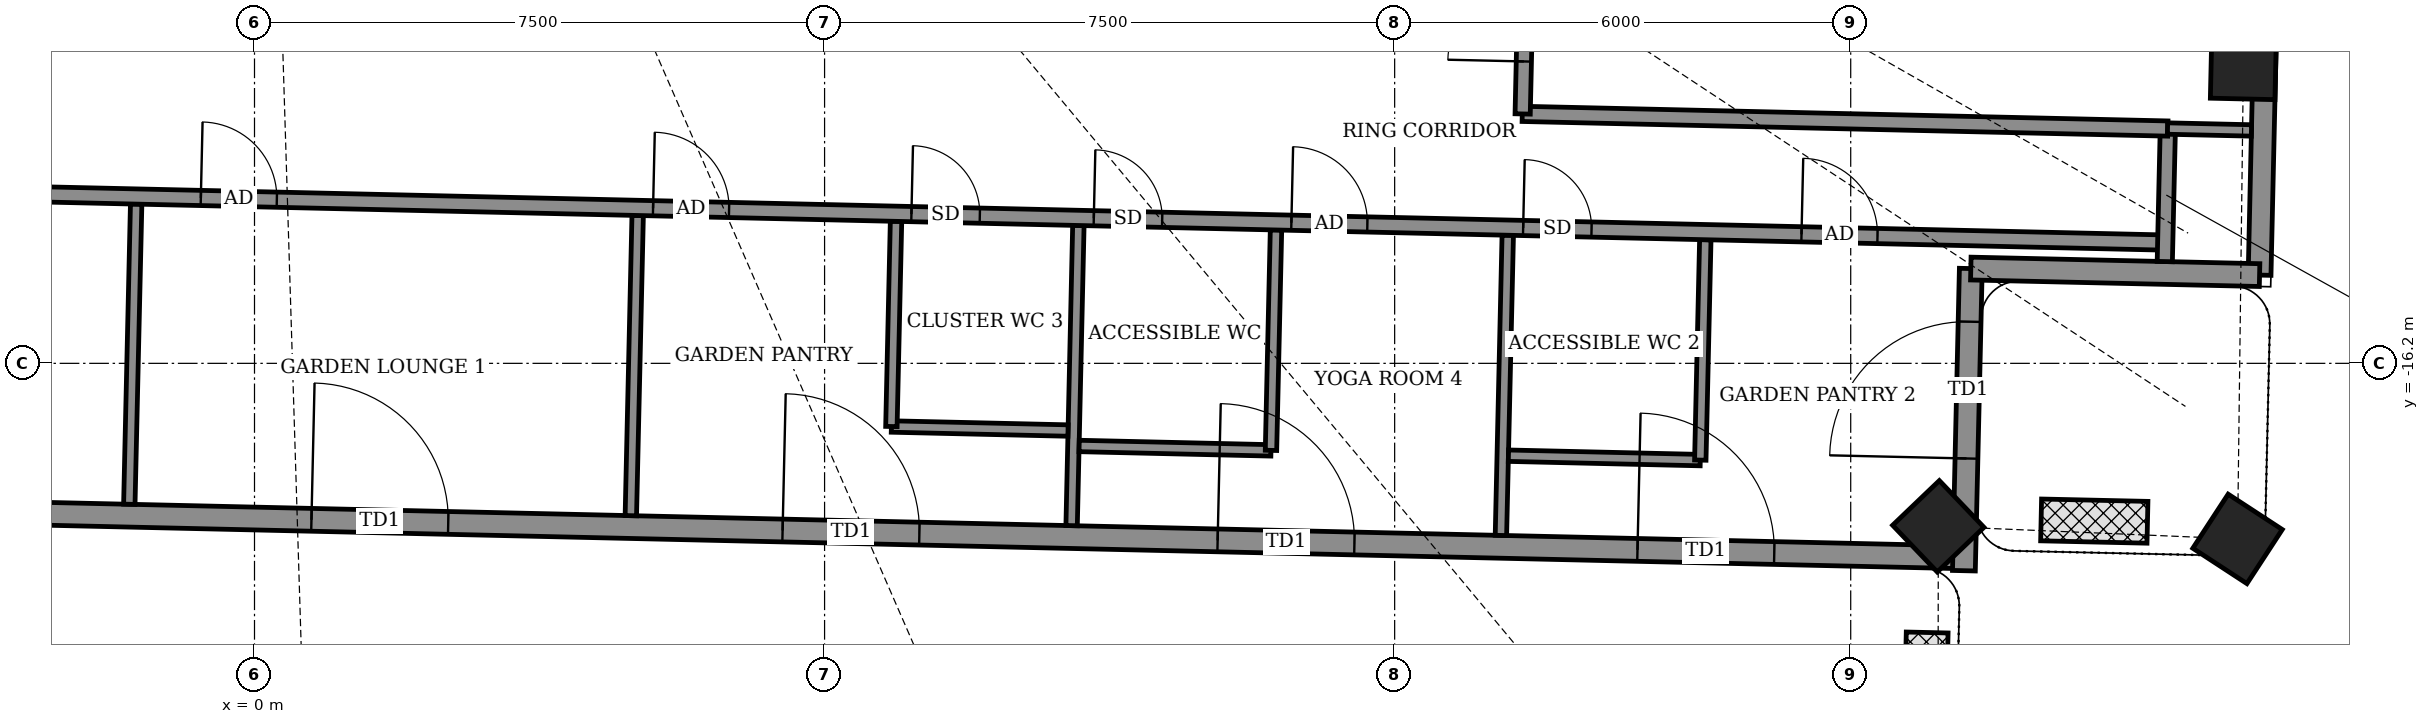
"""IFC4 building model, lengths in metres.
Left out: names, types, materials, properties, quantities, classifications, styles, units other than length and angle.
Written with IfcOpenShell. Run it as: python <this file> out.ifc"""

import sys

from ifc_helpers import new_model, si_unit, direction, frame, frame_2d, origin, origin_2d, place, context, subcontext, project, spatial, rectangle, extrude, element, fill, save


model = new_model("IFC4")
c1 = context("Model", 3, precision=1e-05, world=origin(), true_north=direction((0.0, 1.0)))
c2 = subcontext(c1, "Body", "Model", "MODEL_VIEW")
j1 = project(units=[si_unit("LENGTHUNIT", "METRE"), si_unit("PLANEANGLEUNIT", "RADIAN")], contexts=[c1])
p1 = place(None, origin())
s1 = spatial("IfcSite", under=j1, at=p1, CompositionType="ELEMENT")
p2 = place(p1, origin())
s2 = spatial("IfcBuilding", under=s1, at=p2, CompositionType="ELEMENT")
p3 = place(p2, frame((0.0, 0.0, 337.9)))
s3 = spatial("IfcBuildingStorey", under=s2, at=p3, CompositionType="ELEMENT", Elevation=337.9)
for number, where, z_axis, x_axis in (
    (1, (22.152, -18.344, -0.55), (0.0, 0.0, 1.0), (0.723, 0.691, 0.0)),
    (2, (26.089, -18.51, -0.55), (0.0, 0.0, 1.0), (0.547, 0.837, 0.0)),
    (3, (26.166, -12.296, -0.55), (0.0, 0.0, 1.0), (0.023, 1.0, 0.0)),
):
    element("IfcColumn", number, at=place(p3, frame(where, z_axis=z_axis, x_axis=x_axis)), inside=s3, PredefinedType="COLUMN", context=c2, shape_type="SweptSolid", body=[
        extrude(rectangle(XDim=0.85, YDim=0.85, at=origin_2d()), origin(), (0.0, 0.0, 1.0), 4.6),
    ])
p4 = place(p3, frame((26.379, -15.039, 0.0), z_axis=(0.0, 0.0, 1.0), x_axis=(0.022668695782, 0.9997430321, 0.0)))
e4 = element("IfcWall", 4, at=p4, inside=s3, PredefinedType="SOLIDWALL", context=c2, shape_type="SweptSolid", body=[
    extrude(rectangle(XDim=9.574, YDim=0.3, at=frame_2d((4.787, 0.0))), origin(), (0.0, 0.0, 1.0), 2.75),
])
p5 = place(p4, frame((3.752, 0.0, 0.9)))
e5 = element("IfcOpeningElement", 5, at=p5, cuts=e4, PredefinedType="OPENING", context=c2, shape_type="SweptSolid", body=[
    extrude(rectangle(XDim=2.4, YDim=1.8, at=frame_2d((1.2, 0.9))), frame((0.0, 0.16, 0.0), z_axis=(0.0, -1.0, 0.0), x_axis=(1.0, 0.0, 0.0)), (0.0, 0.0, 1.0), 0.32),
])
p6 = place(p3, frame((-21.395, -17.756, 0.0), z_axis=(0.0, 0.0, 1.0), x_axis=(0.999742664636, -0.022684895998, 0.0)))
e6 = element("IfcWall", 6, at=p6, inside=s3, PredefinedType="SOLIDWALL", context=c2, shape_type="SweptSolid", body=[
    extrude(rectangle(XDim=43.899, YDim=0.3, at=frame_2d((21.95, 0.0))), origin(), (0.0, 0.0, 1.0), 2.65),
])
p7 = place(p6, frame((2.625, 0.0, 0.0)))
e7 = element("IfcOpeningElement", 7, at=p7, cuts=e6, PredefinedType="OPENING", context=c2, shape_type="SweptSolid", body=[
    extrude(rectangle(XDim=1.8, YDim=2.4, at=frame_2d((0.9, 1.2))), frame((0.0, 0.16, 0.0), z_axis=(0.0, -1.0, 0.0), x_axis=(1.0, 0.0, 0.0)), (0.0, 0.0, 1.0), 0.32),
])
p8 = place(p6, frame((10.05, 0.0, 0.0)))
e8 = element("IfcOpeningElement", 8, at=p8, cuts=e6, PredefinedType="OPENING", context=c2, shape_type="SweptSolid", body=[
    extrude(rectangle(XDim=1.8, YDim=2.4, at=frame_2d((0.9, 1.2))), frame((0.0, 0.16, 0.0), z_axis=(0.0, -1.0, 0.0), x_axis=(1.0, 0.0, 0.0)), (0.0, 0.0, 1.0), 0.32),
])
p9 = place(p6, frame((16.325, 0.0, 0.0)))
e9 = element("IfcOpeningElement", 9, at=p9, cuts=e6, PredefinedType="OPENING", context=c2, shape_type="SweptSolid", body=[
    extrude(rectangle(XDim=1.8, YDim=2.4, at=frame_2d((0.9, 1.2))), frame((0.0, 0.16, 0.0), z_axis=(0.0, -1.0, 0.0), x_axis=(1.0, 0.0, 0.0)), (0.0, 0.0, 1.0), 0.32),
])
p10 = place(p6, frame((22.15, 0.0, 0.0)))
e10 = element("IfcOpeningElement", 10, at=p10, cuts=e6, PredefinedType="OPENING", context=c2, shape_type="SweptSolid", body=[
    extrude(rectangle(XDim=1.8, YDim=2.4, at=frame_2d((0.9, 1.2))), frame((0.0, 0.16, 0.0), z_axis=(0.0, -1.0, 0.0), x_axis=(1.0, 0.0, 0.0)), (0.0, 0.0, 1.0), 0.32),
])
p11 = place(p6, frame((28.35, 0.0, 0.0)))
e11 = element("IfcOpeningElement", 11, at=p11, cuts=e6, PredefinedType="OPENING", context=c2, shape_type="SweptSolid", body=[
    extrude(rectangle(XDim=1.8, YDim=2.4, at=frame_2d((0.9, 1.2))), frame((0.0, 0.16, 0.0), z_axis=(0.0, -1.0, 0.0), x_axis=(1.0, 0.0, 0.0)), (0.0, 0.0, 1.0), 0.32),
])
p12 = place(p6, frame((34.075, 0.0, 0.0)))
e12 = element("IfcOpeningElement", 12, at=p12, cuts=e6, PredefinedType="OPENING", context=c2, shape_type="SweptSolid", body=[
    extrude(rectangle(XDim=1.8, YDim=2.4, at=frame_2d((0.9, 1.2))), frame((0.0, 0.16, 0.0), z_axis=(0.0, -1.0, 0.0), x_axis=(1.0, 0.0, 0.0)), (0.0, 0.0, 1.0), 0.32),
])
p13 = place(p6, frame((39.6, 0.0, 0.0)))
e13 = element("IfcOpeningElement", 13, at=p13, cuts=e6, PredefinedType="OPENING", context=c2, shape_type="SweptSolid", body=[
    extrude(rectangle(XDim=1.8, YDim=2.4, at=frame_2d((0.9, 1.2))), frame((0.0, 0.16, 0.0), z_axis=(0.0, -1.0, 0.0), x_axis=(1.0, 0.0, 0.0)), (0.0, 0.0, 1.0), 0.32),
])
p14 = place(p3, frame((22.489, -18.928, 0.0), z_axis=(0.0, 0.0, 1.0), x_axis=(0.022902724569, 0.999737698203, 0.0)))
e14 = element("IfcWall", 14, at=p14, inside=s3, PredefinedType="SOLIDWALL", context=c2, shape_type="SweptSolid", body=[
    extrude(rectangle(XDim=3.976, YDim=0.3, at=frame_2d((1.988, 0.0))), origin(), (0.0, 0.0, 1.0), 2.65),
])
p15 = place(p14, frame((1.477, 0.0, 0.0)))
e15 = element("IfcOpeningElement", 15, at=p15, cuts=e14, PredefinedType="OPENING", context=c2, shape_type="SweptSolid", body=[
    extrude(rectangle(XDim=1.8, YDim=2.4, at=frame_2d((0.9, 1.2))), frame((0.0, 0.16, 0.0), z_axis=(0.0, -1.0, 0.0), x_axis=(1.0, 0.0, 0.0)), (0.0, 0.0, 1.0), 0.32),
])
p16 = place(p3, frame((22.58, -14.953, 0.0), z_axis=(0.0, 0.0, 1.0), x_axis=(0.999742763477, -0.022680539557, 0.0)))
e16 = element("IfcWall", 16, at=p16, inside=s3, PredefinedType="SOLIDWALL", context=c2, shape_type="SweptSolid", body=[
    extrude(rectangle(XDim=3.8, YDim=0.3, at=frame_2d((1.9, 0.0))), origin(), (0.0, 0.0, 1.0), 2.65),
])
p17 = place(p3, frame((24.904, -18.291, 0.0), z_axis=(0.0, 0.0, 1.0), x_axis=(-0.999754553574, 0.022154742332, 0.0)))
e17 = element("IfcWall", 17, at=p17, inside=s3, PredefinedType="USERDEFINED", context=c2, shape_type="SweptSolid", body=[
    extrude(rectangle(XDim=1.399, YDim=0.55, at=frame_2d((0.7, 0.0))), origin(), (0.0, 0.0, 1.0), 0.8),
])
p18 = place(p3, frame((22.006, -19.741, 0.0), z_axis=(0.0, 0.0, 1.0), x_axis=(-0.022836240226, -0.999739219063, 0.0)))
e18 = element("IfcWall", 18, at=p18, inside=s3, PredefinedType="USERDEFINED", context=c2, shape_type="SweptSolid", body=[
    extrude(rectangle(XDim=1.4, YDim=0.55, at=frame_2d((0.7, 0.0))), origin(), (0.0, 0.0, 1.0), 0.8),
])
p19 = place(p3, frame((-1.647, -18.054, 0.0), z_axis=(0.0, 0.0, 1.0), x_axis=(0.022807049009, 0.999739885428, 0.0)))
e19 = element("IfcWall", 19, at=p19, inside=s3, PredefinedType="PARTITIONING", context=c2, shape_type="SweptSolid", body=[
    extrude(rectangle(XDim=3.95, YDim=0.15, at=frame_2d((1.975, 0.0))), origin(), (0.0, 0.0, 1.0), 4.05),
])
p20 = place(p3, frame((4.951, -18.204, 0.0), z_axis=(0.0, 0.0, 1.0), x_axis=(0.022805639811, 0.999739917575, 0.0)))
e20 = element("IfcWall", 20, at=p20, inside=s3, PredefinedType="PARTITIONING", context=c2, shape_type="SweptSolid", body=[
    extrude(rectangle(XDim=3.95, YDim=0.15, at=frame_2d((1.975, 0.0))), origin(), (0.0, 0.0, 1.0), 4.05),
])
p21 = place(p3, frame((10.75, -18.335, 0.0), z_axis=(0.0, 0.0, 1.0), x_axis=(0.022559944643, 0.999745492062, 0.0)))
e21 = element("IfcWall", 21, at=p21, inside=s3, PredefinedType="PARTITIONING", context=c2, shape_type="SweptSolid", body=[
    extrude(rectangle(XDim=3.95, YDim=0.15, at=frame_2d((1.975, 0.0))), origin(), (0.0, 0.0, 1.0), 4.05),
])
p22 = place(p3, frame((16.398, -18.464, 0.0), z_axis=(0.0, 0.0, 1.0), x_axis=(0.022805639811, 0.999739917575, 0.0)))
e22 = element("IfcWall", 22, at=p22, inside=s3, PredefinedType="PARTITIONING", context=c2, shape_type="SweptSolid", body=[
    extrude(rectangle(XDim=3.95, YDim=0.15, at=frame_2d((1.975, 0.0))), origin(), (0.0, 0.0, 1.0), 4.05),
])
p23 = place(p3, frame((10.849, -17.287, 0.0), z_axis=(0.0, 0.0, 1.0), x_axis=(0.999737322729, -0.022919108675, 0.0)))
e23 = element("IfcWall", 23, at=p23, inside=s3, PredefinedType="PARTITIONING", context=c2, shape_type="SweptSolid", body=[
    extrude(rectangle(XDim=2.525, YDim=0.15, at=frame_2d((1.262, 0.0))), origin(), (0.0, 0.0, 1.0), 4.05),
])
p24 = place(p3, frame((13.373, -17.345, 0.0), z_axis=(0.0, 0.0, 1.0), x_axis=(0.022725229174, 0.999741748633, 0.0)))
e24 = element("IfcWall", 24, at=p24, inside=s3, PredefinedType="PARTITIONING", context=c2, shape_type="SweptSolid", body=[
    extrude(rectangle(XDim=2.901, YDim=0.15, at=frame_2d((1.45, 0.0))), origin(), (0.0, 0.0, 1.0), 2.65),
])
p25 = place(p3, frame((16.497, -17.415, 0.0), z_axis=(0.0, 0.0, 1.0), x_axis=(0.999737322729, -0.022919108675, 0.0)))
e25 = element("IfcWall", 25, at=p25, inside=s3, PredefinedType="PARTITIONING", context=c2, shape_type="SweptSolid", body=[
    extrude(rectangle(XDim=2.525, YDim=0.15, at=frame_2d((1.262, 0.0))), origin(), (0.0, 0.0, 1.0), 4.05),
])
p26 = place(p3, frame((19.021, -17.473, 0.0), z_axis=(0.0, 0.0, 1.0), x_axis=(0.022732880677, 0.999741574676, 0.0)))
e26 = element("IfcWall", 26, at=p26, inside=s3, PredefinedType="PARTITIONING", context=c2, shape_type="SweptSolid", body=[
    extrude(rectangle(XDim=2.9, YDim=0.15, at=frame_2d((1.45, 0.0))), origin(), (0.0, 0.0, 1.0), 4.05),
])
p27 = place(p3, frame((8.379, -17.031, 0.0), z_axis=(0.0, 0.0, 1.0), x_axis=(0.999740260747, -0.02279059109, 0.0)))
e27 = element("IfcWall", 27, at=p27, inside=s3, PredefinedType="PARTITIONING", context=c2, shape_type="SweptSolid", body=[
    extrude(rectangle(XDim=2.324, YDim=0.15, at=frame_2d((1.162, 0.0))), origin(), (0.0, 0.0, 1.0), 4.05),
])
p28 = place(p3, frame((8.379, -17.031, 0.0), z_axis=(0.0, 0.0, 1.0), x_axis=(0.02260842146, 0.999744396973, 0.0)))
e28 = element("IfcWall", 28, at=p28, inside=s3, PredefinedType="PARTITIONING", context=c2, shape_type="SweptSolid", body=[
    extrude(rectangle(XDim=2.7, YDim=0.15, at=frame_2d((1.35, 0.0))), origin(), (0.0, 0.0, 1.0), 4.05),
])
p29 = place(p3, frame((-23.849, -13.499, 0.0), z_axis=(0.0, 0.0, 1.0), x_axis=(0.999742429398, -0.022695260756, 0.0)))
e29 = element("IfcWall", 29, at=p29, inside=s3, PredefinedType="PARTITIONING", context=c2, shape_type="SweptSolid", body=[
    extrude(rectangle(XDim=49.0, YDim=0.2, at=frame_2d((24.5, 0.0))), origin(), (0.0, 0.0, 1.0), 2.45),
])
p30 = place(p29, frame((7.55, 0.0, 0.0)))
e30 = element("IfcOpeningElement", 30, at=p30, cuts=e29, PredefinedType="OPENING", context=c2, shape_type="SweptSolid", body=[
    extrude(rectangle(XDim=0.9, YDim=2.1, at=frame_2d((0.45, 1.05))), frame((0.0, 0.11, 0.0), z_axis=(0.0, -1.0, 0.0), x_axis=(1.0, 0.0, 0.0)), (0.0, 0.0, 1.0), 0.22),
])
p31 = place(p29, frame((12.794, 0.0, 0.0)))
e31 = element("IfcOpeningElement", 31, at=p31, cuts=e29, PredefinedType="OPENING", context=c2, shape_type="SweptSolid", body=[
    extrude(rectangle(XDim=1.0, YDim=2.1, at=frame_2d((0.5, 1.05))), frame((0.0, 0.11, 0.0), z_axis=(0.0, -1.0, 0.0), x_axis=(1.0, 0.0, 0.0)), (0.0, 0.0, 1.0), 0.22),
])
p32 = place(p29, frame((9.95, 0.0, 0.0)))
e32 = element("IfcOpeningElement", 32, at=p32, cuts=e29, PredefinedType="OPENING", context=c2, shape_type="SweptSolid", body=[
    extrude(rectangle(XDim=0.9, YDim=2.1, at=frame_2d((0.45, 1.05))), frame((0.0, 0.11, 0.0), z_axis=(0.0, -1.0, 0.0), x_axis=(1.0, 0.0, 0.0)), (0.0, 0.0, 1.0), 0.22),
])
p33 = place(p29, frame((17.45, 0.0, 0.0)))
e33 = element("IfcOpeningElement", 33, at=p33, cuts=e29, PredefinedType="OPENING", context=c2, shape_type="SweptSolid", body=[
    extrude(rectangle(XDim=1.0, YDim=2.1, at=frame_2d((0.5, 1.05))), frame((0.0, 0.11, 0.0), z_axis=(0.0, -1.0, 0.0), x_axis=(1.0, 0.0, 0.0)), (0.0, 0.0, 1.0), 0.22),
])
p34 = place(p29, frame((23.149, 0.0, 0.0)))
e34 = element("IfcOpeningElement", 34, at=p34, cuts=e29, PredefinedType="OPENING", context=c2, shape_type="SweptSolid", body=[
    extrude(rectangle(XDim=1.0, YDim=2.1, at=frame_2d((0.5, 1.05))), frame((0.0, 0.11, 0.0), z_axis=(0.0, -1.0, 0.0), x_axis=(1.0, 0.0, 0.0)), (0.0, 0.0, 1.0), 0.22),
])
p35 = place(p29, frame((29.1, 0.0, 0.0)))
e35 = element("IfcOpeningElement", 35, at=p35, cuts=e29, PredefinedType="OPENING", context=c2, shape_type="SweptSolid", body=[
    extrude(rectangle(XDim=1.0, YDim=2.1, at=frame_2d((0.5, 1.05))), frame((0.0, 0.11, 0.0), z_axis=(0.0, -1.0, 0.0), x_axis=(1.0, 0.0, 0.0)), (0.0, 0.0, 1.0), 0.22),
])
p36 = place(p29, frame((32.5, 0.0, 0.0)))
e36 = element("IfcOpeningElement", 36, at=p36, cuts=e29, PredefinedType="OPENING", context=c2, shape_type="SweptSolid", body=[
    extrude(rectangle(XDim=0.9, YDim=2.1, at=frame_2d((0.45, 1.05))), frame((0.0, 0.11, 0.0), z_axis=(0.0, -1.0, 0.0), x_axis=(1.0, 0.0, 0.0)), (0.0, 0.0, 1.0), 0.22),
])
p37 = place(p29, frame((37.5, 0.0, 0.0)))
e37 = element("IfcOpeningElement", 37, at=p37, cuts=e29, PredefinedType="OPENING", context=c2, shape_type="SweptSolid", body=[
    extrude(rectangle(XDim=1.0, YDim=2.1, at=frame_2d((0.5, 1.05))), frame((0.0, 0.11, 0.0), z_axis=(0.0, -1.0, 0.0), x_axis=(1.0, 0.0, 0.0)), (0.0, 0.0, 1.0), 0.22),
])
p38 = place(p29, frame((34.9, 0.0, 0.0)))
e38 = element("IfcOpeningElement", 38, at=p38, cuts=e29, PredefinedType="OPENING", context=c2, shape_type="SweptSolid", body=[
    extrude(rectangle(XDim=0.9, YDim=2.1, at=frame_2d((0.45, 1.05))), frame((0.0, 0.11, 0.0), z_axis=(0.0, -1.0, 0.0), x_axis=(1.0, 0.0, 0.0)), (0.0, 0.0, 1.0), 0.22),
])
p39 = place(p29, frame((44.213, 0.0, 0.0)))
e39 = element("IfcOpeningElement", 39, at=p39, cuts=e29, PredefinedType="OPENING", context=c2, shape_type="SweptSolid", body=[
    extrude(rectangle(XDim=1.0, YDim=2.1, at=frame_2d((0.5, 1.05))), frame((0.0, 0.11, 0.0), z_axis=(0.0, -1.0, 0.0), x_axis=(1.0, 0.0, 0.0)), (0.0, 0.0, 1.0), 0.22),
])
p40 = place(p29, frame((40.55, 0.0, 0.0)))
e40 = element("IfcOpeningElement", 40, at=p40, cuts=e29, PredefinedType="OPENING", context=c2, shape_type="SweptSolid", body=[
    extrude(rectangle(XDim=0.9, YDim=2.1, at=frame_2d((0.45, 1.05))), frame((0.0, 0.11, 0.0), z_axis=(0.0, -1.0, 0.0), x_axis=(1.0, 0.0, 0.0)), (0.0, 0.0, 1.0), 0.22),
])
p41 = place(p3, frame((25.132, -14.861, 0.0), z_axis=(0.0, 0.0, 1.0), x_axis=(0.02287347828, 0.99973836777, 0.0)))
e41 = element("IfcWall", 41, at=p41, inside=s3, PredefinedType="PARTITIONING", context=c2, shape_type="SweptSolid", body=[
    extrude(rectangle(XDim=1.75, YDim=0.2, at=frame_2d((0.875, 0.0))), origin(), (0.0, 0.0, 1.0), 2.75),
])
p42 = place(p3, frame((16.679, -12.918, 0.0), z_axis=(0.0, 0.0, 1.0), x_axis=(0.999741598108, -0.022731850181, 0.0)))
e42 = element("IfcWall", 42, at=p42, inside=s3, PredefinedType="PARTITIONING", context=c2, shape_type="SweptSolid", body=[
    extrude(rectangle(XDim=8.495, YDim=0.2, at=frame_2d((4.248, 0.0))), origin(), (0.0, 0.0, 1.0), 2.65),
])
p43 = place(p3, frame((16.684, -12.919, 0.0), z_axis=(0.0, 0.0, 1.0), x_axis=(0.022667483124, 0.999743059595, 0.0)))
e43 = element("IfcWall", 43, at=p43, inside=s3, PredefinedType="PARTITIONING", context=c2, shape_type="SweptSolid", body=[
    extrude(rectangle(XDim=5.245, YDim=0.2, at=frame_2d((2.623, 0.0))), origin(), (0.0, 0.0, 1.0), 2.65),
])
p44 = place(p43, frame((0.691, 0.0, 0.0)))
e44 = element("IfcOpeningElement", 44, at=p44, cuts=e43, PredefinedType="OPENING", context=c2, shape_type="SweptSolid", body=[
    extrude(rectangle(XDim=1.0, YDim=2.1, at=frame_2d((0.5, 1.05))), frame((0.0, 0.11, 0.0), z_axis=(0.0, -1.0, 0.0), x_axis=(1.0, 0.0, 0.0)), (0.0, 0.0, 1.0), 0.22),
])
p45 = place(p3, frame((25.168, -13.111, 0.0), z_axis=(0.0, 0.0, 1.0), x_axis=(0.999745701647, -0.022550654924, 0.0)))
e45 = element("IfcWall", 45, at=p45, inside=s3, PredefinedType="PARTITIONING", context=c2, shape_type="SweptSolid", body=[
    extrude(rectangle(XDim=1.104, YDim=0.15, at=frame_2d((0.552, 0.0))), origin(), (0.0, 0.0, 1.0), 2.75),
])
p46 = place(p10, origin())
e46 = element("IfcDoor", 46, at=p46, inside=s3, OperationType="DOUBLE_DOOR_SINGLE_SWING", PredefinedType="DOOR", context=c2, shape_type="SweptSolid", body=[
    extrude(rectangle(XDim=1.8, YDim=2.4, at=frame_2d((0.9, 1.2))), frame((0.0, 0.025, 0.0), z_axis=(0.0, -1.0, 0.0), x_axis=(1.0, 0.0, 0.0)), (0.0, 0.0, 1.0), 0.05),
])
fill(e10, e46)
p47 = place(p11, origin())
e47 = element("IfcDoor", 47, at=p47, inside=s3, OperationType="DOUBLE_DOOR_SINGLE_SWING", PredefinedType="DOOR", context=c2, shape_type="SweptSolid", body=[
    extrude(rectangle(XDim=1.8, YDim=2.4, at=frame_2d((0.9, 1.2))), frame((0.0, 0.025, 0.0), z_axis=(0.0, -1.0, 0.0), x_axis=(1.0, 0.0, 0.0)), (0.0, 0.0, 1.0), 0.05),
])
fill(e11, e47)
p48 = place(p12, origin())
e48 = element("IfcDoor", 48, at=p48, inside=s3, OperationType="DOUBLE_DOOR_SINGLE_SWING", PredefinedType="DOOR", context=c2, shape_type="SweptSolid", body=[
    extrude(rectangle(XDim=1.8, YDim=2.4, at=frame_2d((0.9, 1.2))), frame((0.0, 0.025, 0.0), z_axis=(0.0, -1.0, 0.0), x_axis=(1.0, 0.0, 0.0)), (0.0, 0.0, 1.0), 0.05),
])
fill(e12, e48)
p49 = place(p13, origin())
e49 = element("IfcDoor", 49, at=p49, inside=s3, OperationType="DOUBLE_DOOR_SINGLE_SWING", PredefinedType="DOOR", context=c2, shape_type="SweptSolid", body=[
    extrude(rectangle(XDim=1.8, YDim=2.4, at=frame_2d((0.9, 1.2))), frame((0.0, 0.025, 0.0), z_axis=(0.0, -1.0, 0.0), x_axis=(1.0, 0.0, 0.0)), (0.0, 0.0, 1.0), 0.05),
])
fill(e13, e49)
p50 = place(p15, origin())
e50 = element("IfcDoor", 50, at=p50, inside=s3, OperationType="DOUBLE_DOOR_SINGLE_SWING", PredefinedType="DOOR", context=c2, shape_type="SweptSolid", body=[
    extrude(rectangle(XDim=1.8, YDim=2.4, at=frame_2d((0.9, 1.2))), frame((0.0, 0.025, 0.0), z_axis=(0.0, -1.0, 0.0), x_axis=(1.0, 0.0, 0.0)), (0.0, 0.0, 1.0), 0.05),
])
fill(e15, e50)
p51 = place(p34, origin())
e51 = element("IfcDoor", 51, at=p51, inside=s3, OperationType="SINGLE_SWING_RIGHT", PredefinedType="DOOR", context=c2, shape_type="SweptSolid", body=[
    extrude(rectangle(XDim=1.0, YDim=2.1, at=frame_2d((0.5, 1.05))), frame((0.0, 0.025, 0.0), z_axis=(0.0, -1.0, 0.0), x_axis=(1.0, 0.0, 0.0)), (0.0, 0.0, 1.0), 0.05),
])
fill(e34, e51)
p52 = place(p35, origin())
e52 = element("IfcDoor", 52, at=p52, inside=s3, OperationType="SINGLE_SWING_LEFT", PredefinedType="DOOR", context=c2, shape_type="SweptSolid", body=[
    extrude(rectangle(XDim=1.0, YDim=2.1, at=frame_2d((0.5, 1.05))), frame((0.0, 0.025, 0.0), z_axis=(0.0, -1.0, 0.0), x_axis=(1.0, 0.0, 0.0)), (0.0, 0.0, 1.0), 0.05),
])
fill(e35, e52)
p53 = place(p36, origin())
e53 = element("IfcDoor", 53, at=p53, inside=s3, OperationType="SINGLE_SWING_LEFT", PredefinedType="DOOR", context=c2, shape_type="SweptSolid", body=[
    extrude(rectangle(XDim=0.9, YDim=2.1, at=frame_2d((0.45, 1.05))), frame((0.0, 0.025, 0.0), z_axis=(0.0, -1.0, 0.0), x_axis=(1.0, 0.0, 0.0)), (0.0, 0.0, 1.0), 0.05),
])
fill(e36, e53)
p54 = place(p37, origin())
e54 = element("IfcDoor", 54, at=p54, inside=s3, OperationType="SINGLE_SWING_RIGHT", PredefinedType="DOOR", context=c2, shape_type="SweptSolid", body=[
    extrude(rectangle(XDim=1.0, YDim=2.1, at=frame_2d((0.5, 1.05))), frame((0.0, 0.025, 0.0), z_axis=(0.0, -1.0, 0.0), x_axis=(1.0, 0.0, 0.0)), (0.0, 0.0, 1.0), 0.05),
])
fill(e37, e54)
p55 = place(p38, origin())
e55 = element("IfcDoor", 55, at=p55, inside=s3, OperationType="SINGLE_SWING_RIGHT", PredefinedType="DOOR", context=c2, shape_type="SweptSolid", body=[
    extrude(rectangle(XDim=0.9, YDim=2.1, at=frame_2d((0.45, 1.05))), frame((0.0, 0.025, 0.0), z_axis=(0.0, -1.0, 0.0), x_axis=(1.0, 0.0, 0.0)), (0.0, 0.0, 1.0), 0.05),
])
fill(e38, e55)
p56 = place(p39, origin())
e56 = element("IfcDoor", 56, at=p56, inside=s3, OperationType="SINGLE_SWING_LEFT", PredefinedType="DOOR", context=c2, shape_type="SweptSolid", body=[
    extrude(rectangle(XDim=1.0, YDim=2.1, at=frame_2d((0.5, 1.05))), frame((0.0, 0.025, 0.0), z_axis=(0.0, -1.0, 0.0), x_axis=(1.0, 0.0, 0.0)), (0.0, 0.0, 1.0), 0.05),
])
fill(e39, e56)
p57 = place(p40, origin())
e57 = element("IfcDoor", 57, at=p57, inside=s3, OperationType="SINGLE_SWING_LEFT", PredefinedType="DOOR", context=c2, shape_type="SweptSolid", body=[
    extrude(rectangle(XDim=0.9, YDim=2.1, at=frame_2d((0.45, 1.05))), frame((0.0, 0.025, 0.0), z_axis=(0.0, -1.0, 0.0), x_axis=(1.0, 0.0, 0.0)), (0.0, 0.0, 1.0), 0.05),
])
fill(e40, e57)
p58 = place(p44, origin())
e58 = element("IfcDoor", 58, at=p58, inside=s3, OperationType="SINGLE_SWING_RIGHT", PredefinedType="DOOR", context=c2, shape_type="SweptSolid", body=[
    extrude(rectangle(XDim=1.0, YDim=2.1, at=frame_2d((0.5, 1.05))), frame((0.0, 0.025, 0.0), z_axis=(0.0, -1.0, 0.0), x_axis=(1.0, 0.0, 0.0)), (0.0, 0.0, 1.0), 0.05),
])
fill(e44, e58)
save(model, sys.argv[1])
